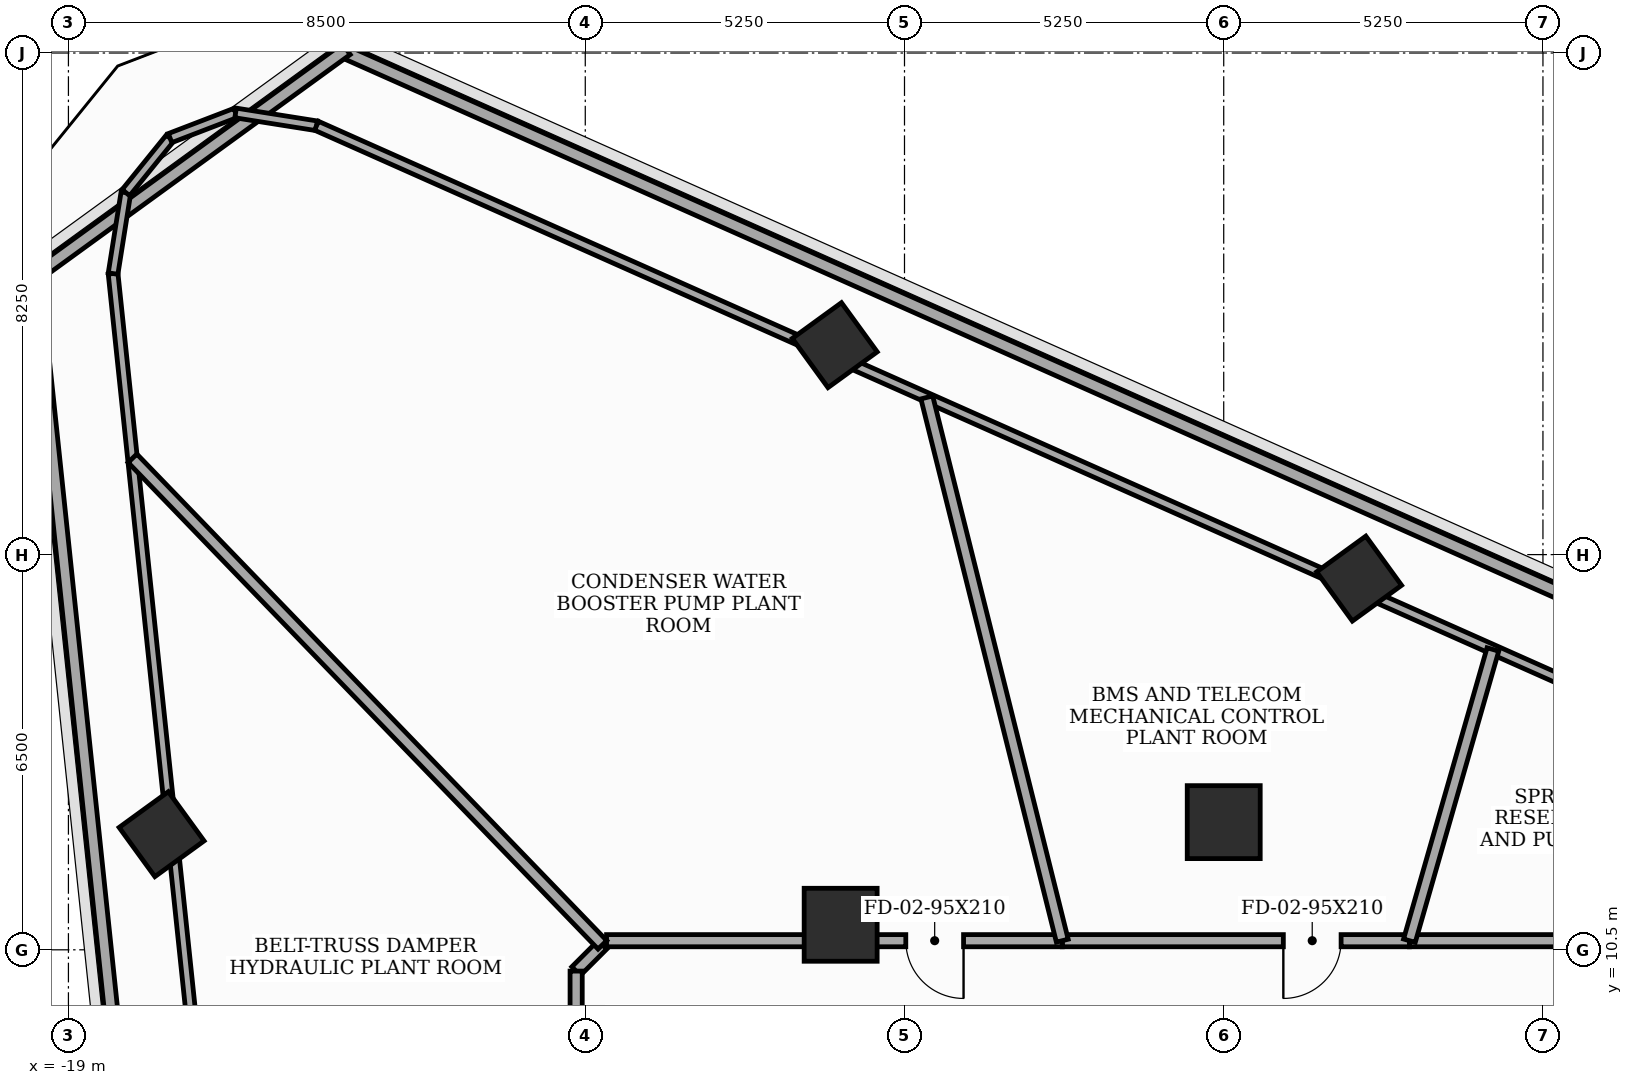
"""IFC4 building model, lengths in metres.
Left out: names, types, materials, properties, quantities, classifications, styles, units other than length and angle.
Written with IfcOpenShell. Run it as: python <this file> out.ifc"""

import sys

from ifc_helpers import new_model, si_unit, direction, frame, frame_2d, origin, origin_2d, place, context, subcontext, project, spatial, rectangle, extrude, element, fill, save


model = new_model("IFC4")
c1 = context("Model", 3, precision=1e-05, world=origin(), true_north=direction((0.0, 1.0)))
c2 = subcontext(c1, "Body", "Model", "MODEL_VIEW")
j1 = project(units=[si_unit("LENGTHUNIT", "METRE"), si_unit("PLANEANGLEUNIT", "RADIAN")], contexts=[c1])
p1 = place(None, origin())
s1 = spatial("IfcSite", under=j1, at=p1, CompositionType="ELEMENT")
p2 = place(p1, origin())
s2 = spatial("IfcBuilding", under=s1, at=p2, CompositionType="ELEMENT")
p3 = place(p2, frame((0.0, 0.0, 149.5)))
s3 = spatial("IfcBuildingStorey", under=s2, at=p3, CompositionType="ELEMENT", Elevation=149.5)
for number, where, z_axis, x_axis in (
    (1, (0.0, 12.6, 0.0), (0.0, 0.0, 1.0), (1.0, 0.0, 0.0)),
    (2, (-6.3, 10.912, 0.0), (0.0, 0.0, 1.0), (1.0, 0.0, 0.0)),
):
    element("IfcColumn", number, at=place(p3, frame(where, z_axis=z_axis, x_axis=x_axis)), inside=s3, PredefinedType="COLUMN", context=c2, shape_type="SweptSolid", body=[
        extrude(rectangle(XDim=1.2, YDim=1.2, at=origin_2d()), origin(), (0.0, 0.0, 1.0), 5.1),
    ])
for number, where, z_axis, x_axis in (
    (3, (2.227, 16.605, 0.0), (0.0, 0.0, 1.0), (0.809, 0.588, 0.0)),
    (4, (-6.397, 20.445, 0.0), (0.0, 0.0, 1.0), (0.809, 0.588, 0.0)),
    (5, (-17.468, 12.402, 0.0), (0.0, 0.0, 1.0), (0.809, 0.588, 0.0)),
):
    element("IfcColumn", number, at=place(p3, frame(where, z_axis=z_axis, x_axis=x_axis)), inside=s3, PredefinedType="COLUMN", context=c2, shape_type="SweptSolid", body=[
        extrude(rectangle(XDim=1.0, YDim=1.0, at=origin_2d()), origin(), (0.0, 0.0, 1.0), 5.1),
    ])
p4 = place(p3, frame((28.558, 6.119, 0.0), z_axis=(0.0, 0.0, 1.0), x_axis=(-0.913545370604, 0.406736838568, 0.0)))
e6 = element("IfcWall", 6, at=p4, inside=s3, PredefinedType="SOLIDWALL", context=c2, shape_type="SweptSolid", body=[
    extrude(rectangle(XDim=47.2, YDim=0.22, at=frame_2d((23.6, 0.0))), origin(), (0.0, 0.0, 1.0), 4.4),
])
p5 = place(p3, frame((-19.578, 21.672, 0.0), z_axis=(0.0, 0.0, 1.0), x_axis=(0.104529964142, -0.994521737619, 0.0)))
e7 = element("IfcWall", 7, at=p5, inside=s3, PredefinedType="SOLIDWALL", context=c2, shape_type="SweptSolid", body=[
    extrude(rectangle(XDim=47.2, YDim=0.22, at=frame_2d((23.6, 0.0))), origin(), (0.0, 0.0, 1.0), 4.4),
])
p6 = place(p3, frame((-14.43, 25.313, 0.0), z_axis=(0.0, 0.0, 1.0), x_axis=(-0.809027567575, -0.587770699256, 0.0)))
e8 = element("IfcWall", 8, at=p6, inside=s3, PredefinedType="SOLIDWALL", context=c2, shape_type="SweptSolid", body=[
    extrude(rectangle(XDim=6.409, YDim=0.22, at=frame_2d((3.204, 0.0))), origin(), (0.0, 0.0, 1.0), 4.4),
])
p7 = place(p3, frame((-13.371, -24.947, 0.0), z_axis=(0.0, 0.0, 1.0), x_axis=(-0.104525741645, 0.994522181419, 0.0)))
e9 = element("IfcWall", 9, at=p7, inside=s3, PredefinedType="SOLIDWALL", context=c2, shape_type="SweptSolid", body=[
    extrude(rectangle(XDim=46.826, YDim=0.16, at=frame_2d((23.413, 0.0))), origin(), (0.0, 0.0, 1.0), 3.485),
])
p8 = place(p3, frame((-18.266, 21.622, 0.0), z_axis=(0.0, 0.0, 1.0), x_axis=(0.156343984174, 0.987702667108, 0.0)))
e10 = element("IfcWall", 10, at=p8, inside=s3, PredefinedType="SOLIDWALL", context=c2, shape_type="SweptSolid", body=[
    extrude(rectangle(XDim=1.348, YDim=0.16, at=frame_2d((0.674, 0.0))), origin(), (0.0, 0.0, 1.0), 4.9),
])
p9 = place(p3, frame((-18.055, 22.953, 0.0), z_axis=(0.0, 0.0, 1.0), x_axis=(0.629325969448, 0.777141444126, 0.0)))
e11 = element("IfcWall", 11, at=p9, inside=s3, PredefinedType="SOLIDWALL", context=c2, shape_type="SweptSolid", body=[
    extrude(rectangle(XDim=1.155, YDim=0.16, at=frame_2d((0.577, 0.0))), origin(), (0.0, 0.0, 1.0), 4.9),
])
p10 = place(p3, frame((-17.328, 23.851, 0.0), z_axis=(0.0, 0.0, 1.0), x_axis=(0.93360702064, 0.35829866175, 0.0)))
e12 = element("IfcWall", 12, at=p10, inside=s3, PredefinedType="SOLIDWALL", context=c2, shape_type="SweptSolid", body=[
    extrude(rectangle(XDim=1.154, YDim=0.16, at=frame_2d((0.577, 0.0))), origin(), (0.0, 0.0, 1.0), 4.9),
])
p11 = place(p3, frame((-16.251, 24.264, 0.0), z_axis=(0.0, 0.0, 1.0), x_axis=(0.987679113551, -0.156492711188, 0.0)))
e13 = element("IfcWall", 13, at=p11, inside=s3, PredefinedType="SOLIDWALL", context=c2, shape_type="SweptSolid", body=[
    extrude(rectangle(XDim=1.348, YDim=0.16, at=frame_2d((0.674, 0.0))), origin(), (0.0, 0.0, 1.0), 4.9),
])
p12 = place(p3, frame((-14.919, 24.053, 0.0), z_axis=(0.0, 0.0, 1.0), x_axis=(0.913544749662, -0.406738233223, 0.0)))
e14 = element("IfcWall", 14, at=p12, inside=s3, PredefinedType="SOLIDWALL", context=c2, shape_type="SweptSolid", body=[
    extrude(rectangle(XDim=46.826, YDim=0.16, at=frame_2d((23.413, 0.0))), origin(), (0.0, 0.0, 1.0), 3.485),
])
p13 = place(p3, frame((10.15, 10.65, 0.0), z_axis=(0.0, 0.0, 1.0), x_axis=(-1.0, 0.0, 0.0)))
e15 = element("IfcWall", 15, at=p13, inside=s3, PredefinedType="SOLIDWALL", context=c2, shape_type="SweptSolid", body=[
    extrude(rectangle(XDim=7.096, YDim=0.2, at=frame_2d((3.548, 0.0))), origin(), (0.0, 0.0, 1.0), 3.485),
])
p14 = place(p13, frame((0.944, 0.0, 0.0)))
e16 = element("IfcOpeningElement", 16, at=p14, cuts=e15, PredefinedType="OPENING", context=c2, shape_type="SweptSolid", body=[
    extrude(rectangle(XDim=0.95, YDim=2.1, at=frame_2d((0.475, 1.05))), frame((0.0, 0.11, 0.0), z_axis=(0.0, -1.0, 0.0), x_axis=(1.0, 0.0, 0.0)), (0.0, 0.0, 1.0), 0.22),
])
p15 = place(p3, frame((3.054, 10.65, 0.0), z_axis=(0.0, 0.0, 1.0), x_axis=(-1.0, 0.0, 0.0)))
e17 = element("IfcWall", 17, at=p15, inside=s3, PredefinedType="SOLIDWALL", context=c2, shape_type="SweptSolid", body=[
    extrude(rectangle(XDim=5.709, YDim=0.2, at=frame_2d((2.854, 0.0))), origin(), (0.0, 0.0, 1.0), 4.285),
])
p16 = place(p15, frame((1.124, 0.0, 0.0)))
e18 = element("IfcOpeningElement", 18, at=p16, cuts=e17, PredefinedType="OPENING", context=c2, shape_type="SweptSolid", body=[
    extrude(rectangle(XDim=0.95, YDim=2.1, at=frame_2d((0.475, 1.05))), frame((0.0, 0.11, 0.0), z_axis=(0.0, -1.0, 0.0), x_axis=(1.0, 0.0, 0.0)), (0.0, 0.0, 1.0), 0.22),
])
p17 = place(p3, frame((-2.655, 10.65, 0.0), z_axis=(0.0, 0.0, 1.0), x_axis=(-1.0, 0.0, 0.0)))
e19 = element("IfcWall", 19, at=p17, inside=s3, PredefinedType="SOLIDWALL", context=c2, shape_type="SweptSolid", body=[
    extrude(rectangle(XDim=7.495, YDim=0.2, at=frame_2d((3.748, 0.0))), origin(), (0.0, 0.0, 1.0), 4.285),
])
p18 = place(p17, frame((1.624, 0.0, 0.0)))
e20 = element("IfcOpeningElement", 20, at=p18, cuts=e19, PredefinedType="OPENING", context=c2, shape_type="SweptSolid", body=[
    extrude(rectangle(XDim=0.95, YDim=2.1, at=frame_2d((0.475, 1.05))), frame((0.0, 0.11, 0.0), z_axis=(0.0, -1.0, 0.0), x_axis=(1.0, 0.0, 0.0)), (0.0, 0.0, 1.0), 0.22),
])
p19 = place(p3, frame((-10.218, 10.582, 0.0), z_axis=(0.0, 0.0, 1.0), x_axis=(-0.706906948845, -0.70730655707, 0.0)))
e21 = element("IfcWall", 21, at=p19, inside=s3, PredefinedType="SOLIDWALL", context=c2, shape_type="SweptSolid", body=[
    extrude(rectangle(XDim=0.611, YDim=0.2, at=frame_2d((0.305, 0.0))), origin(), (0.0, 0.0, 1.0), 4.9),
])
p20 = place(p3, frame((-10.65, 10.15, 0.0), z_axis=(0.0, 0.0, 1.0), x_axis=(0.0, -1.0, 0.0)))
e22 = element("IfcWall", 22, at=p20, inside=s3, PredefinedType="SOLIDWALL", context=c2, shape_type="SweptSolid", body=[
    extrude(rectangle(XDim=7.096, YDim=0.2, at=frame_2d((3.548, 0.0))), origin(), (0.0, 0.0, 1.0), 3.485),
])
p21 = place(p20, frame((1.512, 0.0, 0.0)))
e23 = element("IfcOpeningElement", 23, at=p21, cuts=e22, PredefinedType="OPENING", context=c2, shape_type="SweptSolid", body=[
    extrude(rectangle(XDim=0.95, YDim=2.1, at=frame_2d((0.475, 1.05))), frame((0.0, 0.11, 0.0), z_axis=(0.0, -1.0, 0.0), x_axis=(1.0, 0.0, 0.0)), (0.0, 0.0, 1.0), 0.22),
])
p22 = place(p3, frame((4.427, 15.44, 0.0), z_axis=(0.0, 0.0, 1.0), x_axis=(-0.275549323133, -0.961286934542, 0.0)))
e24 = element("IfcWall", 24, at=p22, inside=s3, PredefinedType="SOLIDWALL", context=c2, shape_type="SweptSolid", body=[
    extrude(rectangle(XDim=4.983, YDim=0.2, at=frame_2d((2.491, 0.0))), origin(), (0.0, 0.0, 1.0), 3.485),
])
p23 = place(p3, frame((-4.883, 19.585, 0.0), z_axis=(0.0, 0.0, 1.0), x_axis=(0.241949196016, -0.97028891911, 0.0)))
e25 = element("IfcWall", 25, at=p23, inside=s3, PredefinedType="SOLIDWALL", context=c2, shape_type="SweptSolid", body=[
    extrude(rectangle(XDim=9.209, YDim=0.2, at=frame_2d((4.604, 0.0))), origin(), (0.0, 0.0, 1.0), 3.485),
])
p24 = place(p3, frame((-17.946, 18.584, 0.0), z_axis=(0.0, 0.0, 1.0), x_axis=(0.694677144831, -0.719321669665, 0.0)))
e26 = element("IfcWall", 26, at=p24, inside=s3, PredefinedType="SOLIDWALL", context=c2, shape_type="SweptSolid", body=[
    extrude(rectangle(XDim=11.125, YDim=0.2, at=frame_2d((5.562, 0.0))), origin(), (0.0, 0.0, 1.0), 3.485),
])
p25 = place(p16, origin())
e27 = element("IfcDoor", 27, at=p25, inside=s3, OperationType="SINGLE_SWING_RIGHT", PredefinedType="DOOR", context=c2, shape_type="SweptSolid", body=[
    extrude(rectangle(XDim=0.95, YDim=2.1, at=frame_2d((0.475, 1.05))), frame((0.0, 0.025, 0.0), z_axis=(0.0, -1.0, 0.0), x_axis=(1.0, 0.0, 0.0)), (0.0, 0.0, 1.0), 0.05),
])
fill(e18, e27)
p26 = place(p18, origin())
e28 = element("IfcDoor", 28, at=p26, inside=s3, OperationType="SINGLE_SWING_LEFT", PredefinedType="DOOR", context=c2, shape_type="SweptSolid", body=[
    extrude(rectangle(XDim=0.95, YDim=2.1, at=frame_2d((0.475, 1.05))), frame((0.0, 0.025, 0.0), z_axis=(0.0, -1.0, 0.0), x_axis=(1.0, 0.0, 0.0)), (0.0, 0.0, 1.0), 0.05),
])
fill(e20, e28)
save(model, sys.argv[1])
